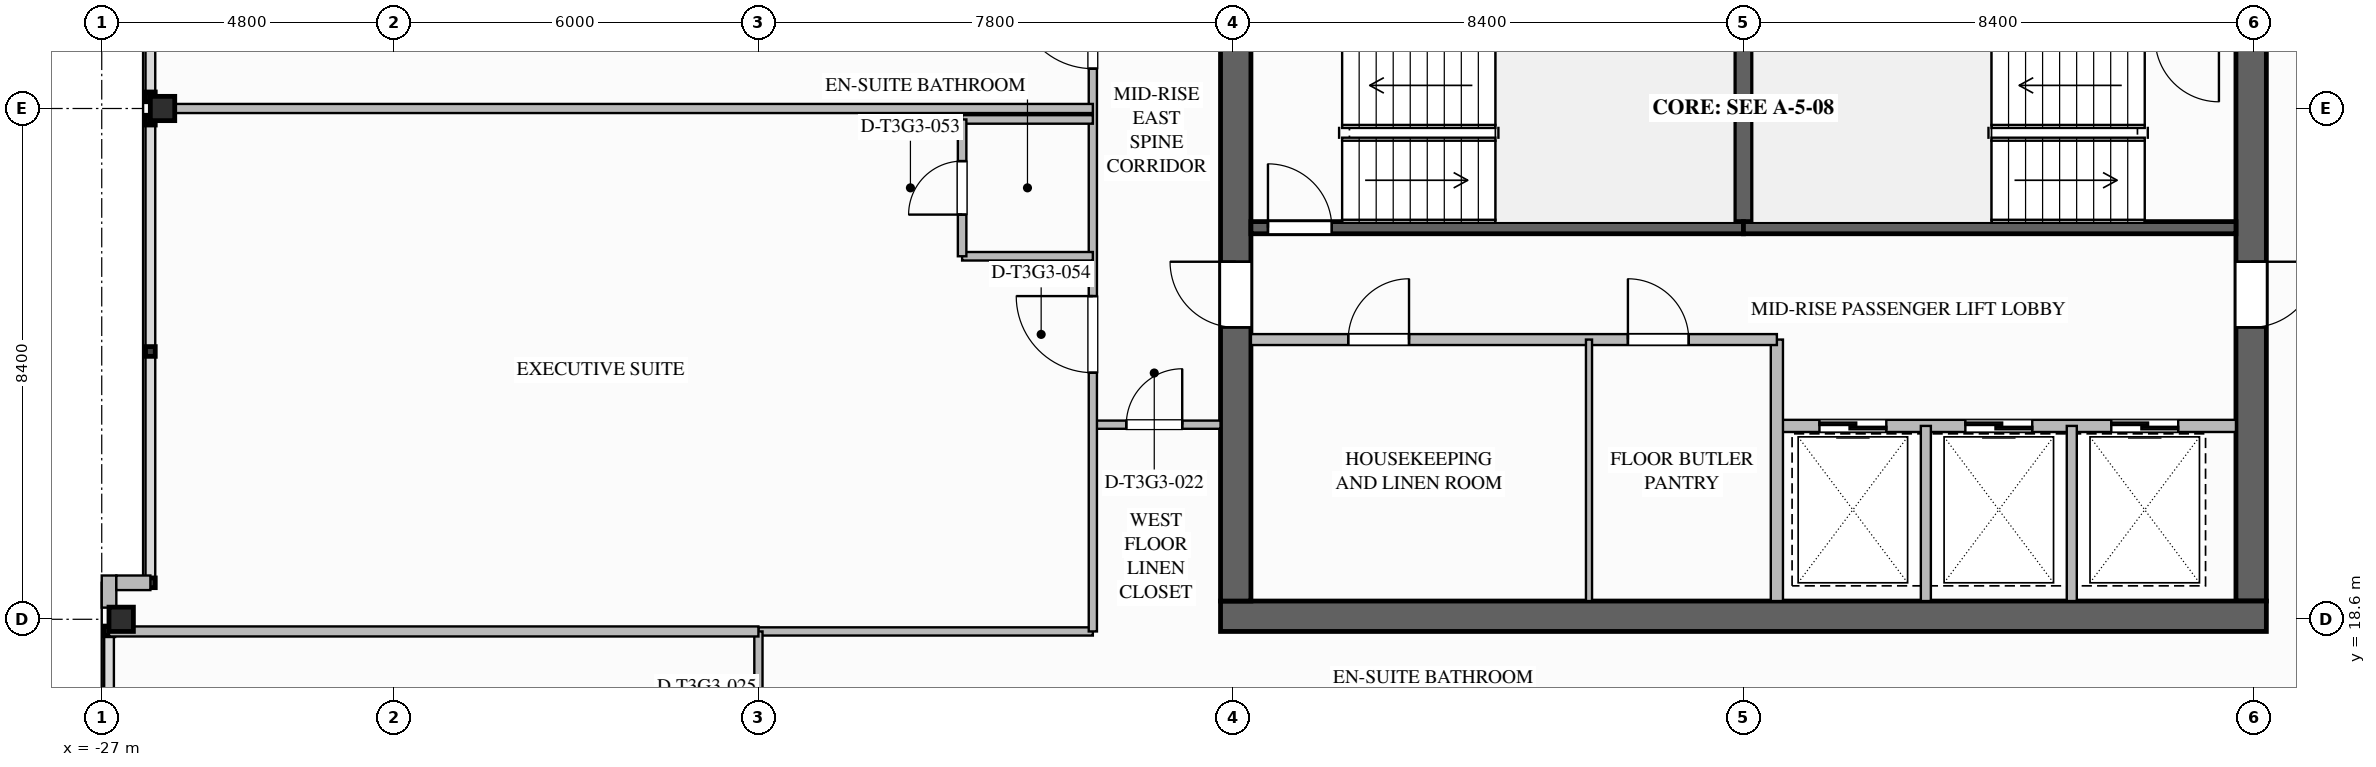
"""IFC4 building model, lengths in metres.
Left out: names, types, materials, properties, quantities, classifications, styles, units other than length and angle.
Written with IfcOpenShell. Run it as: python <this file> out.ifc"""

import sys

from ifc_helpers import new_model, si_unit, direction, frame, frame_2d, origin, origin_2d, place, context, subcontext, project, spatial, rectangle, i_section, extrude, element, fill, save


model = new_model("IFC4")
c1 = context("Model", 3, precision=1e-05, world=origin(), true_north=direction((0.0, 1.0)))
c2 = subcontext(c1, "Body", "Model", "MODEL_VIEW")
j1 = project(units=[si_unit("LENGTHUNIT", "METRE"), si_unit("PLANEANGLEUNIT", "RADIAN")], contexts=[c1])
p1 = place(None, origin())
s1 = spatial("IfcSite", under=j1, at=p1, CompositionType="ELEMENT")
p2 = place(p1, origin())
s2 = spatial("IfcBuilding", under=s1, at=p2, CompositionType="ELEMENT")
p3 = place(p2, frame((0.0, 0.0, 178.8)))
s3 = spatial("IfcBuildingStorey", under=s2, at=p3, CompositionType="ELEMENT", Elevation=178.8)
p4 = place(p3, frame((8.35, 35.1, 0.0), z_axis=(0.0, 0.0, 1.0), x_axis=(0.0, -1.0, 0.0)))
e1 = element("IfcWall", 1, at=p4, inside=s3, PredefinedType="SHEAR", context=c2, shape_type="SweptSolid", body=[
    extrude(rectangle(XDim=16.2, YDim=0.5, at=frame_2d((8.1, 0.0))), origin(), (0.0, 0.0, 1.0), 3.55),
])
p5 = place(p4, frame((3.08, 0.0, 0.0)))
e2 = element("IfcOpeningElement", 2, at=p5, cuts=e1, PredefinedType="OPENING", context=c2, shape_type="SweptSolid", body=[
    extrude(rectangle(XDim=1.12, YDim=2.1, at=frame_2d((0.56, 1.05))), frame((0.0, 0.26, 0.0), z_axis=(0.0, -1.0, 0.0), x_axis=(1.0, 0.0, 0.0)), (0.0, 0.0, 1.0), 0.52),
])
p6 = place(p4, frame((10.62, 0.0, 0.0)))
e3 = element("IfcOpeningElement", 3, at=p6, cuts=e1, PredefinedType="OPENING", context=c2, shape_type="SweptSolid", body=[
    extrude(rectangle(XDim=1.08, YDim=2.04, at=frame_2d((0.54, 1.02))), frame((0.0, 0.26, 0.0), z_axis=(0.0, -1.0, 0.0), x_axis=(1.0, 0.0, 0.0)), (0.0, 0.0, 1.0), 0.52),
])
p7 = place(p3, frame((8.6, 18.65, 0.0), z_axis=(0.0, 0.0, 1.0), x_axis=(-1.0, 0.0, 0.0)))
e4 = element("IfcWall", 4, at=p7, inside=s3, PredefinedType="SHEAR", context=c2, shape_type="SweptSolid", body=[
    extrude(rectangle(XDim=17.2, YDim=0.5, at=frame_2d((8.6, 0.0))), origin(), (0.0, 0.0, 1.0), 3.55),
])
p8 = place(p3, frame((-8.35, 18.9, 0.0), z_axis=(0.0, 0.0, 1.0), x_axis=(0.0, 1.0, 0.0)))
e5 = element("IfcWall", 5, at=p8, inside=s3, PredefinedType="SHEAR", context=c2, shape_type="SweptSolid", body=[
    extrude(rectangle(XDim=16.2, YDim=0.5, at=frame_2d((8.1, 0.0))), origin(), (0.0, 0.0, 1.0), 3.55),
])
p9 = place(p8, frame((12.02, 0.0, 0.0)))
e6 = element("IfcOpeningElement", 6, at=p9, cuts=e5, PredefinedType="OPENING", context=c2, shape_type="SweptSolid", body=[
    extrude(rectangle(XDim=1.08, YDim=2.04, at=frame_2d((0.54, 1.02))), frame((0.0, 0.26, 0.0), z_axis=(0.0, -1.0, 0.0), x_axis=(1.0, 0.0, 0.0)), (0.0, 0.0, 1.0), 0.52),
])
p10 = place(p8, frame((4.5, 0.0, 0.0)))
e7 = element("IfcOpeningElement", 7, at=p10, cuts=e5, PredefinedType="OPENING", context=c2, shape_type="SweptSolid", body=[
    extrude(rectangle(XDim=1.08, YDim=2.04, at=frame_2d((0.54, 1.02))), frame((0.0, 0.26, 0.0), z_axis=(0.0, -1.0, 0.0), x_axis=(1.0, 0.0, 0.0)), (0.0, 0.0, 1.0), 0.52),
])
for number, where, z_axis, x_axis in (
    (8, (-26.68, 18.6, 0.0), (0.0, 0.0, 1.0), (1.0, 0.0, 0.0)),
    (9, (-26.0, 27.0, 0.0), (0.0, 0.0, 1.0), (1.0, 0.0, 0.0)),
):
    element("IfcColumn", number, at=place(p3, frame(where, z_axis=z_axis, x_axis=x_axis)), inside=s3, PredefinedType="COLUMN", context=c2, shape_type="SweptSolid", body=[
        extrude(i_section(OverallWidth=0.401, OverallDepth=0.399, WebThickness=0.025, FlangeThickness=0.04, FilletRadius=0.025, at=origin_2d()), origin(), (0.0, 0.0, 1.0), 3.547),
    ])
p11 = place(p3, frame((-26.88, 18.792, 0.0), z_axis=(0.0, 0.0, 1.0), x_axis=(0.0, 1.0, 0.0)))
e10 = element("IfcWall", 10, at=p11, inside=s3, PredefinedType="STANDARD", context=c2, shape_type="SweptSolid", body=[
    extrude(rectangle(XDim=0.528, YDim=0.24, at=frame_2d((0.264, 0.0))), origin(), (0.0, 0.0, 1.0), 3.29),
])
p12 = place(p3, frame((-26.76, 19.2, 0.0), z_axis=(0.0, 0.0, 1.0), x_axis=(1.0, 0.0, 0.0)))
e11 = element("IfcWall", 11, at=p12, inside=s3, PredefinedType="STANDARD", context=c2, shape_type="SweptSolid", body=[
    extrude(rectangle(XDim=0.56, YDim=0.24, at=frame_2d((0.28, 0.0))), origin(), (0.0, 0.0, 1.0), 3.29),
])
p13 = place(p3, frame((0.0, 25.04, 0.0), z_axis=(0.0, 0.0, 1.0), x_axis=(0.0, 1.0, 0.0)))
e12 = element("IfcWall", 12, at=p13, inside=s3, PredefinedType="SOLIDWALL", context=c2, shape_type="SweptSolid", body=[
    extrude(rectangle(XDim=3.12, YDim=0.3, at=frame_2d((1.56, 0.0))), origin(), (0.0, 0.0, 1.0), 3.29),
])
p14 = place(p3, frame((-8.1, 25.04, 0.0), z_axis=(0.0, 0.0, 1.0), x_axis=(1.0, 0.0, 0.0)))
e13 = element("IfcWall", 13, at=p14, inside=s3, PredefinedType="SOLIDWALL", context=c2, shape_type="SweptSolid", body=[
    extrude(rectangle(XDim=8.1, YDim=0.2, at=frame_2d((4.05, 0.0))), origin(), (0.0, 0.0, 1.0), 3.29),
])
p15 = place(p14, frame((0.28, 0.0, 0.0)))
e14 = element("IfcOpeningElement", 14, at=p15, cuts=e13, PredefinedType="OPENING", context=c2, shape_type="SweptSolid", body=[
    extrude(rectangle(XDim=1.05, YDim=2.1, at=frame_2d((0.525, 1.05))), frame((0.0, 0.11, 0.0), z_axis=(0.0, -1.0, 0.0), x_axis=(1.0, 0.0, 0.0)), (0.0, 0.0, 1.0), 0.22),
])
p16 = place(p3, frame((0.0, 25.04, 0.0), z_axis=(0.0, 0.0, 1.0), x_axis=(1.0, 0.0, 0.0)))
e15 = element("IfcWall", 15, at=p16, inside=s3, PredefinedType="SOLIDWALL", context=c2, shape_type="SweptSolid", body=[
    extrude(rectangle(XDim=8.1, YDim=0.2, at=frame_2d((4.05, 0.0))), origin(), (0.0, 0.0, 1.0), 3.29),
])
p17 = place(p3, frame((8.1, 21.78, 0.0), z_axis=(0.0, 0.0, 1.0), x_axis=(-1.0, 0.0, 0.0)))
e16 = element("IfcWall", 16, at=p17, inside=s3, PredefinedType="SOLIDWALL", context=c2, shape_type="SweptSolid", body=[
    extrude(rectangle(XDim=7.55, YDim=0.2, at=frame_2d((3.775, 0.0))), origin(), (0.0, 0.0, 1.0), 3.29),
])
p18 = place(p17, frame((5.75, 0.0, 0.0)))
e17 = element("IfcOpeningElement", 17, at=p18, cuts=e16, PredefinedType="OPENING", context=c2, shape_type="SweptSolid", body=[
    extrude(rectangle(XDim=1.1, YDim=2.2, at=frame_2d((0.55, 1.1))), frame((0.0, 0.11, 0.0), z_axis=(0.0, -1.0, 0.0), x_axis=(1.0, 0.0, 0.0)), (0.0, 0.0, 1.0), 0.22),
])
p19 = place(p17, frame((3.35, 0.0, 0.0)))
e18 = element("IfcOpeningElement", 18, at=p19, cuts=e16, PredefinedType="OPENING", context=c2, shape_type="SweptSolid", body=[
    extrude(rectangle(XDim=1.1, YDim=2.2, at=frame_2d((0.55, 1.1))), frame((0.0, 0.11, 0.0), z_axis=(0.0, -1.0, 0.0), x_axis=(1.0, 0.0, 0.0)), (0.0, 0.0, 1.0), 0.22),
])
p20 = place(p17, frame((0.95, 0.0, 0.0)))
e19 = element("IfcOpeningElement", 19, at=p20, cuts=e16, PredefinedType="OPENING", context=c2, shape_type="SweptSolid", body=[
    extrude(rectangle(XDim=1.1, YDim=2.2, at=frame_2d((0.55, 1.1))), frame((0.0, 0.11, 0.0), z_axis=(0.0, -1.0, 0.0), x_axis=(1.0, 0.0, 0.0)), (0.0, 0.0, 1.0), 0.22),
])
p21 = place(p3, frame((0.55, 18.9, 0.0), z_axis=(0.0, 0.0, 1.0), x_axis=(0.0, 1.0, 0.0)))
e20 = element("IfcWall", 20, at=p21, inside=s3, PredefinedType="SOLIDWALL", context=c2, shape_type="SweptSolid", body=[
    extrude(rectangle(XDim=4.3, YDim=0.2, at=frame_2d((2.15, 0.0))), origin(), (0.0, 0.0, 1.0), 3.29),
])
for number, where, z_axis, x_axis in (
    (21, (3.0, 18.9, 0.0), (0.0, 0.0, 1.0), (0.0, 1.0, 0.0)),
    (22, (5.4, 18.9, 0.0), (0.0, 0.0, 1.0), (0.0, 1.0, 0.0)),
):
    element("IfcWall", number, at=place(p3, frame(where, z_axis=z_axis, x_axis=x_axis)), inside=s3, PredefinedType="PARTITIONING", context=c2, shape_type="SweptSolid", body=[
        extrude(rectangle(XDim=2.88, YDim=0.165, at=frame_2d((1.44, 0.0))), origin(), (0.0, 0.0, 1.0), 3.29),
    ])
p22 = place(p3, frame((-8.1, 23.2, 0.0), z_axis=(0.0, 0.0, 1.0), x_axis=(1.0, 0.0, 0.0)))
e23 = element("IfcWall", 23, at=p22, inside=s3, PredefinedType="SOLIDWALL", context=c2, shape_type="SweptSolid", body=[
    extrude(rectangle(XDim=8.65, YDim=0.18, at=frame_2d((4.325, 0.0))), origin(), (0.0, 0.0, 1.0), 3.29),
])
p23 = place(p22, frame((1.6, 0.0, 0.0)))
e24 = element("IfcOpeningElement", 24, at=p23, cuts=e23, PredefinedType="OPENING", context=c2, shape_type="SweptSolid", body=[
    extrude(rectangle(XDim=1.0, YDim=2.1, at=frame_2d((0.5, 1.05))), frame((0.0, 0.1, 0.0), z_axis=(0.0, -1.0, 0.0), x_axis=(1.0, 0.0, 0.0)), (0.0, 0.0, 1.0), 0.2),
])
p24 = place(p22, frame((6.2, 0.0, 0.0)))
e25 = element("IfcOpeningElement", 25, at=p24, cuts=e23, PredefinedType="OPENING", context=c2, shape_type="SweptSolid", body=[
    extrude(rectangle(XDim=1.0, YDim=2.1, at=frame_2d((0.5, 1.05))), frame((0.0, 0.1, 0.0), z_axis=(0.0, -1.0, 0.0), x_axis=(1.0, 0.0, 0.0)), (0.0, 0.0, 1.0), 0.2),
])
p25 = place(p3, frame((-2.54, 18.9, 0.0), z_axis=(0.0, 0.0, 1.0), x_axis=(0.0, 1.0, 0.0)))
e26 = element("IfcWall", 26, at=p25, inside=s3, PredefinedType="PARTITIONING", context=c2, shape_type="SweptSolid", body=[
    extrude(rectangle(XDim=4.3, YDim=0.1, at=frame_2d((2.15, 0.0))), origin(), (0.0, 0.0, 1.0), 3.29),
])
p26 = place(p3, frame((-10.7, 21.8, 0.0), z_axis=(0.0, 0.0, 1.0), x_axis=(1.0, 0.0, 0.0)))
e27 = element("IfcWall", 27, at=p26, inside=s3, PredefinedType="PARTITIONING", context=c2, shape_type="SweptSolid", body=[
    extrude(rectangle(XDim=2.1, YDim=0.135, at=frame_2d((1.05, 0.0))), origin(), (0.0, 0.0, 1.0), 3.29),
])
p27 = place(p26, frame((0.55, 0.0, 0.0)))
e28 = element("IfcOpeningElement", 28, at=p27, cuts=e27, PredefinedType="OPENING", context=c2, shape_type="SweptSolid", body=[
    extrude(rectangle(XDim=0.92, YDim=2.1, at=frame_2d((0.46, 1.05))), frame((0.0, 0.077, 0.0), z_axis=(0.0, -1.0, 0.0), x_axis=(1.0, 0.0, 0.0)), (0.0, 0.0, 1.0), 0.155),
])
p28 = place(p3, frame((-16.2, 18.4, 0.0), z_axis=(0.0, 0.0, 1.0), x_axis=(1.0, 0.0, 0.0)))
e29 = element("IfcWall", 29, at=p28, inside=s3, PredefinedType="PARTITIONING", context=c2, shape_type="SweptSolid", body=[
    extrude(rectangle(XDim=5.5, YDim=0.135, at=frame_2d((2.75, 0.0))), origin(), (0.0, 0.0, 1.0), 2.667),
])
p29 = place(p3, frame((-10.7, 18.4, 0.0), z_axis=(0.0, 0.0, 1.0), x_axis=(0.0, 1.0, 0.0)))
e30 = element("IfcWall", 30, at=p29, inside=s3, PredefinedType="PARTITIONING", context=c2, shape_type="SweptSolid", body=[
    extrude(rectangle(XDim=17.2, YDim=0.135, at=frame_2d((8.6, 0.0))), origin(), (0.0, 0.0, 1.0), 3.29),
])
p30 = place(p29, frame((4.255, 0.0, 0.0)))
e31 = element("IfcOpeningElement", 31, at=p30, cuts=e30, PredefinedType="OPENING", context=c2, shape_type="SweptSolid", body=[
    extrude(rectangle(XDim=1.26, YDim=2.2, at=frame_2d((0.63, 1.1))), frame((0.0, 0.077, 0.0), z_axis=(0.0, -1.0, 0.0), x_axis=(1.0, 0.0, 0.0)), (0.0, 0.0, 1.0), 0.155),
])
p31 = place(p29, frame((9.255, 0.0, 0.0)))
e32 = element("IfcOpeningElement", 32, at=p31, cuts=e30, PredefinedType="OPENING", context=c2, shape_type="SweptSolid", body=[
    extrude(rectangle(XDim=1.26, YDim=2.2, at=frame_2d((0.63, 1.1))), frame((0.0, 0.077, 0.0), z_axis=(0.0, -1.0, 0.0), x_axis=(1.0, 0.0, 0.0)), (0.0, 0.0, 1.0), 0.155),
])
p32 = place(p3, frame((-16.2, 15.45, 0.0), z_axis=(0.0, 0.0, 1.0), x_axis=(0.0, 1.0, 0.0)))
e33 = element("IfcWall", 33, at=p32, inside=s3, PredefinedType="PARTITIONING", context=c2, shape_type="SweptSolid", body=[
    extrude(rectangle(XDim=2.95, YDim=0.135, at=frame_2d((1.475, 0.0))), origin(), (0.0, 0.0, 1.0), 2.58),
])
p33 = place(p32, frame((0.52, 0.0, 0.0)))
e34 = element("IfcOpeningElement", 34, at=p33, cuts=e33, PredefinedType="OPENING", context=c2, shape_type="SweptSolid", body=[
    extrude(rectangle(XDim=1.02, YDim=2.15, at=frame_2d((0.51, 1.075))), frame((0.0, 0.077, 0.0), z_axis=(0.0, -1.0, 0.0), x_axis=(1.0, 0.0, 0.0)), (0.0, 0.0, 1.0), 0.155),
])
p34 = place(p3, frame((-26.88, 18.4, 0.0), z_axis=(0.0, 0.0, 1.0), x_axis=(1.0, 0.0, 0.0)))
e35 = element("IfcWall", 35, at=p34, inside=s3, PredefinedType="PARTITIONING", context=c2, shape_type="SweptSolid", body=[
    extrude(rectangle(XDim=10.68, YDim=0.165, at=frame_2d((5.34, 0.0))), origin(), (0.0, 0.0, 1.0), 2.58),
])
p35 = place(p3, frame((-26.2, 27.0, 0.0), z_axis=(0.0, 0.0, 1.0), x_axis=(1.0, 0.0, 0.0)))
e36 = element("IfcWall", 36, at=p35, inside=s3, PredefinedType="PARTITIONING", context=c2, shape_type="SweptSolid", body=[
    extrude(rectangle(XDim=15.5, YDim=0.15, at=frame_2d((7.75, 0.0))), origin(), (0.0, 0.0, 1.0), 2.58),
])
p36 = place(p3, frame((-10.7, 24.57, 0.0), z_axis=(0.0, 0.0, 1.0), x_axis=(-1.0, 0.0, 0.0)))
e37 = element("IfcWall", 37, at=p36, inside=s3, PredefinedType="PLUMBINGWALL", context=c2, shape_type="SweptSolid", body=[
    extrude(rectangle(XDim=2.15, YDim=0.14, at=frame_2d((1.075, 0.0))), origin(), (0.0, 0.0, 1.0), 3.29),
])
p37 = place(p3, frame((-10.7, 26.82, 0.0), z_axis=(0.0, 0.0, 1.0), x_axis=(-1.0, 0.0, 0.0)))
e38 = element("IfcWall", 38, at=p37, inside=s3, PredefinedType="PLUMBINGWALL", context=c2, shape_type="SweptSolid", body=[
    extrude(rectangle(XDim=2.15, YDim=0.14, at=frame_2d((1.075, 0.0))), origin(), (0.0, 0.0, 1.0), 2.667),
])
p38 = place(p3, frame((-12.85, 24.57, 0.0), z_axis=(0.0, 0.0, 1.0), x_axis=(0.0, 1.0, 0.0)))
e39 = element("IfcWall", 39, at=p38, inside=s3, PredefinedType="PLUMBINGWALL", context=c2, shape_type="SweptSolid", body=[
    extrude(rectangle(XDim=2.25, YDim=0.14, at=frame_2d((1.125, 0.0))), origin(), (0.0, 0.0, 1.0), 3.29),
])
p39 = place(p38, frame((0.685, 0.0, 0.0)))
e40 = element("IfcOpeningElement", 40, at=p39, cuts=e39, PredefinedType="OPENING", context=c2, shape_type="SweptSolid", body=[
    extrude(rectangle(XDim=0.88, YDim=2.1, at=frame_2d((0.44, 1.05))), frame((0.0, 0.08, 0.0), z_axis=(0.0, -1.0, 0.0), x_axis=(1.0, 0.0, 0.0)), (0.0, 0.0, 1.0), 0.16),
])
p40 = place(p15, origin())
e41 = element("IfcDoor", 41, at=p40, inside=s3, OperationType="SINGLE_SWING_LEFT", PredefinedType="DOOR", context=c2, shape_type="SweptSolid", body=[
    extrude(rectangle(XDim=1.05, YDim=2.1, at=frame_2d((0.525, 1.05))), frame((0.0, 0.025, 0.0), z_axis=(0.0, -1.0, 0.0), x_axis=(1.0, 0.0, 0.0)), (0.0, 0.0, 1.0), 0.05),
])
fill(e14, e41)
p41 = place(p18, origin())
e42 = element("IfcDoor", 42, at=p41, inside=s3, OperationType="SLIDING_TO_LEFT", PredefinedType="DOOR", context=c2, shape_type="SweptSolid", body=[
    extrude(rectangle(XDim=1.1, YDim=2.2, at=frame_2d((0.55, 1.1))), frame((0.0, 0.025, 0.0), z_axis=(0.0, -1.0, 0.0), x_axis=(1.0, 0.0, 0.0)), (0.0, 0.0, 1.0), 0.05),
])
fill(e17, e42)
p42 = place(p19, origin())
e43 = element("IfcDoor", 43, at=p42, inside=s3, OperationType="SLIDING_TO_LEFT", PredefinedType="DOOR", context=c2, shape_type="SweptSolid", body=[
    extrude(rectangle(XDim=1.1, YDim=2.2, at=frame_2d((0.55, 1.1))), frame((0.0, 0.025, 0.0), z_axis=(0.0, -1.0, 0.0), x_axis=(1.0, 0.0, 0.0)), (0.0, 0.0, 1.0), 0.05),
])
fill(e18, e43)
p43 = place(p20, origin())
e44 = element("IfcDoor", 44, at=p43, inside=s3, OperationType="SLIDING_TO_LEFT", PredefinedType="DOOR", context=c2, shape_type="SweptSolid", body=[
    extrude(rectangle(XDim=1.1, YDim=2.2, at=frame_2d((0.55, 1.1))), frame((0.0, 0.025, 0.0), z_axis=(0.0, -1.0, 0.0), x_axis=(1.0, 0.0, 0.0)), (0.0, 0.0, 1.0), 0.05),
])
fill(e19, e44)
p44 = place(p10, origin())
e45 = element("IfcDoor", 45, at=p44, inside=s3, OperationType="SINGLE_SWING_RIGHT", PredefinedType="DOOR", context=c2, shape_type="SweptSolid", body=[
    extrude(rectangle(XDim=1.08, YDim=2.04, at=frame_2d((0.54, 1.02))), frame((0.0, 0.025, 0.0), z_axis=(0.0, -1.0, 0.0), x_axis=(1.0, 0.0, 0.0)), (0.0, 0.0, 1.0), 0.05),
])
fill(e7, e45)
p45 = place(p6, origin())
e46 = element("IfcDoor", 46, at=p45, inside=s3, OperationType="SINGLE_SWING_LEFT", PredefinedType="DOOR", context=c2, shape_type="SweptSolid", body=[
    extrude(rectangle(XDim=1.08, YDim=2.04, at=frame_2d((0.54, 1.02))), frame((0.0, 0.025, 0.0), z_axis=(0.0, -1.0, 0.0), x_axis=(1.0, 0.0, 0.0)), (0.0, 0.0, 1.0), 0.05),
])
fill(e3, e46)
p46 = place(p23, origin())
e47 = element("IfcDoor", 47, at=p46, inside=s3, OperationType="SINGLE_SWING_RIGHT", PredefinedType="DOOR", context=c2, shape_type="SweptSolid", body=[
    extrude(rectangle(XDim=1.0, YDim=2.1, at=frame_2d((0.5, 1.05))), frame((0.0, 0.025, 0.0), z_axis=(0.0, -1.0, 0.0), x_axis=(1.0, 0.0, 0.0)), (0.0, 0.0, 1.0), 0.05),
])
fill(e24, e47)
p47 = place(p24, origin())
e48 = element("IfcDoor", 48, at=p47, inside=s3, OperationType="SINGLE_SWING_LEFT", PredefinedType="DOOR", context=c2, shape_type="SweptSolid", body=[
    extrude(rectangle(XDim=1.0, YDim=2.1, at=frame_2d((0.5, 1.05))), frame((0.0, 0.025, 0.0), z_axis=(0.0, -1.0, 0.0), x_axis=(1.0, 0.0, 0.0)), (0.0, 0.0, 1.0), 0.05),
])
fill(e25, e48)
p48 = place(p27, origin())
e49 = element("IfcDoor", 49, at=p48, inside=s3, OperationType="SINGLE_SWING_RIGHT", PredefinedType="DOOR", context=c2, shape_type="SweptSolid", body=[
    extrude(rectangle(XDim=0.92, YDim=2.1, at=frame_2d((0.46, 1.05))), frame((0.0, 0.025, 0.0), z_axis=(0.0, -1.0, 0.0), x_axis=(1.0, 0.0, 0.0)), (0.0, 0.0, 1.0), 0.05),
])
fill(e28, e49)
p49 = place(p39, origin())
e50 = element("IfcDoor", 50, at=p49, inside=s3, OperationType="SINGLE_SWING_LEFT", PredefinedType="DOOR", context=c2, shape_type="SweptSolid", body=[
    extrude(rectangle(XDim=0.88, YDim=2.1, at=frame_2d((0.44, 1.05))), frame((0.0, 0.025, 0.0), z_axis=(0.0, -1.0, 0.0), x_axis=(1.0, 0.0, 0.0)), (0.0, 0.0, 1.0), 0.05),
])
fill(e40, e50)
p50 = place(p30, origin())
e51 = element("IfcDoor", 51, at=p50, inside=s3, OperationType="SINGLE_SWING_RIGHT", PredefinedType="DOOR", context=c2, shape_type="SweptSolid", body=[
    extrude(rectangle(XDim=1.26, YDim=2.2, at=frame_2d((0.63, 1.1))), frame((0.0, 0.025, 0.0), z_axis=(0.0, -1.0, 0.0), x_axis=(1.0, 0.0, 0.0)), (0.0, 0.0, 1.0), 0.05),
])
fill(e31, e51)
p51 = place(p31, origin())
e52 = element("IfcDoor", 52, at=p51, inside=s3, OperationType="SINGLE_SWING_RIGHT", PredefinedType="DOOR", context=c2, shape_type="SweptSolid", body=[
    extrude(rectangle(XDim=1.26, YDim=2.2, at=frame_2d((0.63, 1.1))), frame((0.0, 0.025, 0.0), z_axis=(0.0, -1.0, 0.0), x_axis=(1.0, 0.0, 0.0)), (0.0, 0.0, 1.0), 0.05),
])
fill(e32, e52)
save(model, sys.argv[1])
